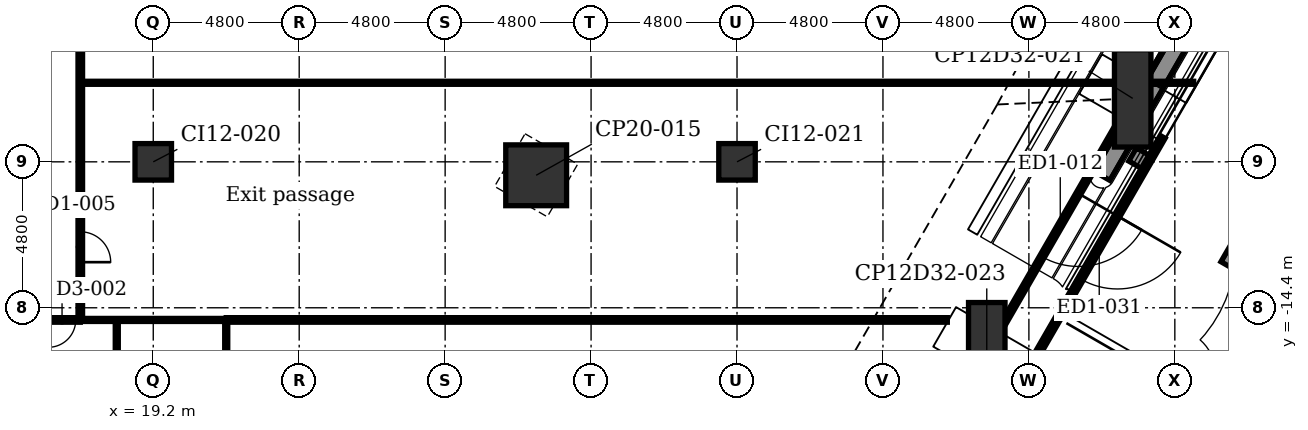
"""IFC4 building model, lengths in metres.
Left out: names, types, materials, properties, quantities, classifications, styles, units other than length and angle.
Written with IfcOpenShell. Run it as: python <this file> out.ifc"""

import sys

from ifc_helpers import new_model, si_unit, direction, frame, frame_2d, origin, origin_2d, place, context, subcontext, project, spatial, rectangle, extrude, element, fill, save


model = new_model("IFC4")
c1 = context("Model", 3, precision=1e-05, world=origin(), true_north=direction((0.0, 1.0)))
c2 = subcontext(c1, "Body", "Model", "MODEL_VIEW")
j1 = project(units=[si_unit("LENGTHUNIT", "METRE"), si_unit("PLANEANGLEUNIT", "RADIAN")], contexts=[c1])
p1 = place(None, origin())
s1 = spatial("IfcSite", under=j1, at=p1, CompositionType="ELEMENT")
p2 = place(p1, origin())
s2 = spatial("IfcBuilding", under=s1, at=p2, CompositionType="ELEMENT")
p3 = place(p2, origin())
s3 = spatial("IfcBuildingStorey", under=s2, at=p3, CompositionType="ELEMENT", Elevation=0.0)
for number, where, z_axis, x_axis in (
    (1, (51.414, -7.514, -0.4), (0.0, 0.0, 1.0), (0.5, 0.866, 0.0)),
    (2, (46.614, -15.828, -0.4), (0.0, 0.0, 1.0), (0.5, 0.866, 0.0)),
):
    element("IfcColumn", number, at=place(p3, frame(where, z_axis=z_axis, x_axis=x_axis)), inside=s3, PredefinedType="COLUMN", context=c2, shape_type="SweptSolid", body=[
        extrude(rectangle(XDim=1.2, YDim=3.2, at=origin_2d()), origin(), (0.0, 0.0, 1.0), 7.1),
    ])
p4 = place(p3, frame((31.794, -10.042, -0.4), z_axis=(0.0, 0.0, 1.0), x_axis=(0.5, 0.866025403784, 0.0)))
e3 = element("IfcColumn", 3, at=p4, inside=s3, PredefinedType="COLUMN", context=c2, shape_type="SweptSolid", body=[
    extrude(rectangle(XDim=2.0, YDim=2.0, at=origin_2d()), origin(), (0.0, 0.0, 1.0), 7.1),
])
for number, where, z_axis, x_axis in (
    (4, (19.2, -9.6, -0.4), (0.0, 0.0, 1.0), (1.0, 0.0, 0.0)),
    (5, (38.4, -9.6, -0.4), (0.0, 0.0, 1.0), (1.0, 0.0, 0.0)),
):
    element("IfcColumn", number, at=place(p3, frame(where, z_axis=z_axis, x_axis=x_axis)), inside=s3, PredefinedType="COLUMN", context=c2, shape_type="SweptSolid", body=[
        extrude(rectangle(XDim=1.2, YDim=1.2, at=origin_2d()), origin(), (0.0, 0.0, 1.0), 7.1),
    ])
p5 = place(p3, frame((51.131, -8.045, 0.0), z_axis=(0.0, 0.0, 1.0), x_axis=(-0.49999513524, -0.866028212437, 0.0)))
e6 = element("IfcWall", 6, at=p5, inside=s3, PredefinedType="PARTITIONING", context=c2, shape_type="SweptSolid", body=[
    extrude(rectangle(XDim=8.396, YDim=0.16, at=frame_2d((4.198, 0.0))), origin(), (0.0, 0.0, 1.0), 6.7),
])
p6 = place(p5, frame((2.998, 0.0, 0.0)))
e7 = element("IfcOpeningElement", 7, at=p6, cuts=e6, PredefinedType="OPENING", context=c2, shape_type="SweptSolid", body=[
    extrude(rectangle(XDim=2.4, YDim=2.4, at=frame_2d((1.2, 1.2))), frame((0.0, 0.09, 0.0), z_axis=(0.0, -1.0, 0.0), x_axis=(1.0, 0.0, 0.0)), (0.0, 0.0, 1.0), 0.18),
])
p7 = place(p3, frame((52.411, -8.787, 0.0), z_axis=(0.0, 0.0, 1.0), x_axis=(-0.499996941814, -0.866027169422, 0.0)))
e8 = element("IfcWall", 8, at=p7, inside=s3, PredefinedType="PARTITIONING", context=c2, shape_type="SweptSolid", body=[
    extrude(rectangle(XDim=8.392, YDim=0.16, at=frame_2d((4.196, 0.0))), origin(), (0.0, 0.0, 1.0), 6.7),
])
p8 = place(p7, frame((2.996, 0.0, 0.0)))
e9 = element("IfcOpeningElement", 9, at=p8, cuts=e8, PredefinedType="OPENING", context=c2, shape_type="SweptSolid", body=[
    extrude(rectangle(XDim=2.4, YDim=2.4, at=frame_2d((1.2, 1.2))), frame((0.0, 0.09, 0.0), z_axis=(0.0, -1.0, 0.0), x_axis=(1.0, 0.0, 0.0)), (0.0, 0.0, 1.0), 0.18),
])
p9 = place(p3, frame((53.405, -4.865, 7.0), z_axis=(0.0, 0.0, 1.0), x_axis=(-0.499990139034, -0.866031096941, 0.0)))
e10 = element("IfcWall", 10, at=p9, inside=s3, PredefinedType="USERDEFINED", context=c2, shape_type="SweptSolid", body=[
    extrude(rectangle(XDim=6.0, YDim=0.6, at=frame_2d((3.0, 0.0))), origin(), (0.0, 0.0, 1.0), 0.7),
])
p10 = place(p3, frame((60.577, -2.643, 0.0), z_axis=(0.0, 0.0, 1.0), x_axis=(-0.49999894854, -0.866026010844, 0.0)))
e11 = element("IfcWall", 11, at=p10, inside=s3, PredefinedType="USERDEFINED", context=c2, shape_type="SweptSolid", body=[
    extrude(rectangle(XDim=12.0, YDim=0.6, at=frame_2d((6.0, 0.0))), origin(), (0.0, 0.0, 1.0), 0.7),
])
p11 = place(p3, frame((51.753, -9.268, 0.0), z_axis=(0.0, 0.0, 1.0), x_axis=(-0.500131122175, -0.865949687125, 0.0)))
e12 = element("IfcWall", 12, at=p11, inside=s3, PredefinedType="SOLIDWALL", context=c2, shape_type="SweptSolid", body=[
    extrude(rectangle(XDim=0.5, YDim=0.5, at=frame_2d((0.25, 0.0))), origin(), (0.0, 0.0, 1.0), 6.4),
])
p12 = place(p3, frame((21.6, -49.713, 0.0), z_axis=(0.0, 0.0, 1.0), x_axis=(0.0, 1.0, 0.0)))
e13 = element("IfcWall", 13, at=p12, inside=s3, PredefinedType="PARTITIONING", context=c2, shape_type="SweptSolid", body=[
    extrude(rectangle(XDim=34.913, YDim=0.1, at=frame_2d((17.457, 0.0))), origin(), (0.0, 0.0, 1.0), 6.7),
])
p13 = place(p3, frame((18.0, -19.6, 0.0), z_axis=(0.0, 0.0, 1.0), x_axis=(0.0, 1.0, 0.0)))
e14 = element("IfcWall", 14, at=p13, inside=s3, PredefinedType="PARTITIONING", context=c2, shape_type="SweptSolid", body=[
    extrude(rectangle(XDim=4.8, YDim=0.1, at=frame_2d((2.4, 0.0))), origin(), (0.0, 0.0, 1.0), 6.7),
])
p14 = place(p3, frame((16.8, -14.8, 0.0), z_axis=(0.0, 0.0, 1.0), x_axis=(0.0, 1.0, 0.0)))
e15 = element("IfcWall", 15, at=p14, inside=s3, PredefinedType="PARTITIONING", context=c2, shape_type="SweptSolid", body=[
    extrude(rectangle(XDim=10.85, YDim=0.15, at=frame_2d((5.425, 0.0))), origin(), (0.0, 0.0, 1.0), 6.7),
])
p15 = place(p14, frame((1.9, 0.0, 0.0)))
e16 = element("IfcOpeningElement", 16, at=p15, cuts=e15, PredefinedType="OPENING", context=c2, shape_type="SweptSolid", body=[
    extrude(rectangle(XDim=1.0, YDim=2.1, at=frame_2d((0.5, 1.05))), frame((0.0, 0.085, 0.0), z_axis=(0.0, -1.0, 0.0), x_axis=(1.0, 0.0, 0.0)), (0.0, 0.0, 1.0), 0.17),
])
p16 = place(p14, frame((8.9, 0.0, 0.0)))
e17 = element("IfcOpeningElement", 17, at=p16, cuts=e15, PredefinedType="OPENING", context=c2, shape_type="SweptSolid", body=[
    extrude(rectangle(XDim=1.0, YDim=2.1, at=frame_2d((0.5, 1.05))), frame((0.0, 0.085, 0.0), z_axis=(0.0, -1.0, 0.0), x_axis=(1.0, 0.0, 0.0)), (0.0, 0.0, 1.0), 0.17),
])
p17 = place(p3, frame((16.8, -14.8, 0.0), z_axis=(0.0, 0.0, 1.0), x_axis=(1.0, 0.0, 0.0)))
e18 = element("IfcWall", 18, at=p17, inside=s3, PredefinedType="PARTITIONING", context=c2, shape_type="SweptSolid", body=[
    extrude(rectangle(XDim=4.8, YDim=0.1, at=frame_2d((2.4, 0.0))), origin(), (0.0, 0.0, 1.0), 6.7),
])
p18 = place(p3, frame((-16.8, -14.8, 0.0), z_axis=(0.0, 0.0, 1.0), x_axis=(1.0, 0.0, 0.0)))
e19 = element("IfcWall", 19, at=p18, inside=s3, PredefinedType="PARTITIONING", context=c2, shape_type="SweptSolid", body=[
    extrude(rectangle(XDim=33.6, YDim=0.15, at=frame_2d((16.8, 0.0))), origin(), (0.0, 0.0, 1.0), 6.7),
])
p19 = place(p18, frame((30.15, 0.0, 0.0)))
e20 = element("IfcOpeningElement", 20, at=p19, cuts=e19, PredefinedType="OPENING", context=c2, shape_type="SweptSolid", body=[
    extrude(rectangle(XDim=0.9, YDim=2.1, at=frame_2d((0.45, 1.05))), frame((0.0, 0.085, 0.0), z_axis=(0.0, -1.0, 0.0), x_axis=(1.0, 0.0, 0.0)), (0.0, 0.0, 1.0), 0.17),
])
p20 = place(p18, frame((32.55, 0.0, 0.0)))
e21 = element("IfcOpeningElement", 21, at=p20, cuts=e19, PredefinedType="OPENING", context=c2, shape_type="SweptSolid", body=[
    extrude(rectangle(XDim=0.9, YDim=2.1, at=frame_2d((0.45, 1.05))), frame((0.0, 0.085, 0.0), z_axis=(0.0, -1.0, 0.0), x_axis=(1.0, 0.0, 0.0)), (0.0, 0.0, 1.0), 0.17),
])
p21 = place(p18, frame((2.025, 0.0, 0.0)))
e22 = element("IfcOpeningElement", 22, at=p21, cuts=e19, PredefinedType="OPENING", context=c2, shape_type="SweptSolid", body=[
    extrude(rectangle(XDim=1.8, YDim=2.1, at=frame_2d((0.9, 1.05))), frame((0.0, 0.085, 0.0), z_axis=(0.0, -1.0, 0.0), x_axis=(1.0, 0.0, 0.0)), (0.0, 0.0, 1.0), 0.17),
])
p22 = place(p18, frame((11.775, 0.0, 0.0)))
e23 = element("IfcOpeningElement", 23, at=p22, cuts=e19, PredefinedType="OPENING", context=c2, shape_type="SweptSolid", body=[
    extrude(rectangle(XDim=1.8, YDim=2.1, at=frame_2d((0.9, 1.05))), frame((0.0, 0.085, 0.0), z_axis=(0.0, -1.0, 0.0), x_axis=(1.0, 0.0, 0.0)), (0.0, 0.0, 1.0), 0.17),
])
p23 = place(p18, frame((27.1, 0.0, 0.0)))
e24 = element("IfcOpeningElement", 24, at=p23, cuts=e19, PredefinedType="OPENING", context=c2, shape_type="SweptSolid", body=[
    extrude(rectangle(XDim=1.0, YDim=2.1, at=frame_2d((0.5, 1.05))), frame((0.0, 0.085, 0.0), z_axis=(0.0, -1.0, 0.0), x_axis=(1.0, 0.0, 0.0)), (0.0, 0.0, 1.0), 0.17),
])
p24 = place(p3, frame((16.8, -7.0, 0.0), z_axis=(0.0, 0.0, 1.0), x_axis=(1.0, 0.0, 0.0)))
e25 = element("IfcWall", 25, at=p24, inside=s3, PredefinedType="PARTITIONING", context=c2, shape_type="SweptSolid", body=[
    extrude(rectangle(XDim=36.62, YDim=0.1, at=frame_2d((18.31, 0.0))), origin(), (0.0, 0.0, 1.0), 6.7),
])
p25 = place(p3, frame((21.6, -14.8, 0.0), z_axis=(0.0, 0.0, 1.0), x_axis=(1.0, 0.0, 0.0)))
e26 = element("IfcWall", 26, at=p25, inside=s3, PredefinedType="PARTITIONING", context=c2, shape_type="SweptSolid", body=[
    extrude(rectangle(XDim=23.717, YDim=0.15, at=frame_2d((11.858, 0.0))), origin(), (0.0, 0.0, 1.0), 6.7),
])
p26 = place(p6, origin())
e27 = element("IfcDoor", 27, at=p26, inside=s3, OperationType="DOUBLE_DOOR_DOUBLE_SWING", PredefinedType="DOOR", context=c2, shape_type="SweptSolid", body=[
    extrude(rectangle(XDim=2.4, YDim=2.4, at=frame_2d((1.2, 1.2))), frame((0.0, 0.025, 0.0), z_axis=(0.0, -1.0, 0.0), x_axis=(1.0, 0.0, 0.0)), (0.0, 0.0, 1.0), 0.05),
])
fill(e7, e27)
p27 = place(p8, origin())
e28 = element("IfcDoor", 28, at=p27, inside=s3, OperationType="DOUBLE_DOOR_DOUBLE_SWING", PredefinedType="DOOR", context=c2, shape_type="SweptSolid", body=[
    extrude(rectangle(XDim=2.4, YDim=2.4, at=frame_2d((1.2, 1.2))), frame((0.0, 0.025, 0.0), z_axis=(0.0, -1.0, 0.0), x_axis=(1.0, 0.0, 0.0)), (0.0, 0.0, 1.0), 0.05),
])
fill(e9, e28)
p28 = place(p20, frame((0.9, 0.0, 0.0), z_axis=(0.0, 0.0, 1.0), x_axis=(-1.0, 0.0, 0.0)))
e29 = element("IfcDoor", 29, at=p28, inside=s3, OperationType="SINGLE_SWING_LEFT", PredefinedType="DOOR", context=c2, shape_type="SweptSolid", body=[
    extrude(rectangle(XDim=0.9, YDim=2.1, at=frame_2d((0.45, 1.05))), frame((0.0, 0.025, 0.0), z_axis=(0.0, -1.0, 0.0), x_axis=(1.0, 0.0, 0.0)), (0.0, 0.0, 1.0), 0.05),
])
fill(e21, e29)
p29 = place(p15, frame((1.0, 0.0, 0.0), z_axis=(0.0, 0.0, 1.0), x_axis=(-1.0, 0.0, 0.0)))
e30 = element("IfcDoor", 30, at=p29, inside=s3, OperationType="SINGLE_SWING_LEFT", PredefinedType="DOOR", context=c2, shape_type="SweptSolid", body=[
    extrude(rectangle(XDim=1.0, YDim=2.1, at=frame_2d((0.5, 1.05))), frame((0.0, 0.025, 0.0), z_axis=(0.0, -1.0, 0.0), x_axis=(1.0, 0.0, 0.0)), (0.0, 0.0, 1.0), 0.05),
])
fill(e16, e30)
save(model, sys.argv[1])
